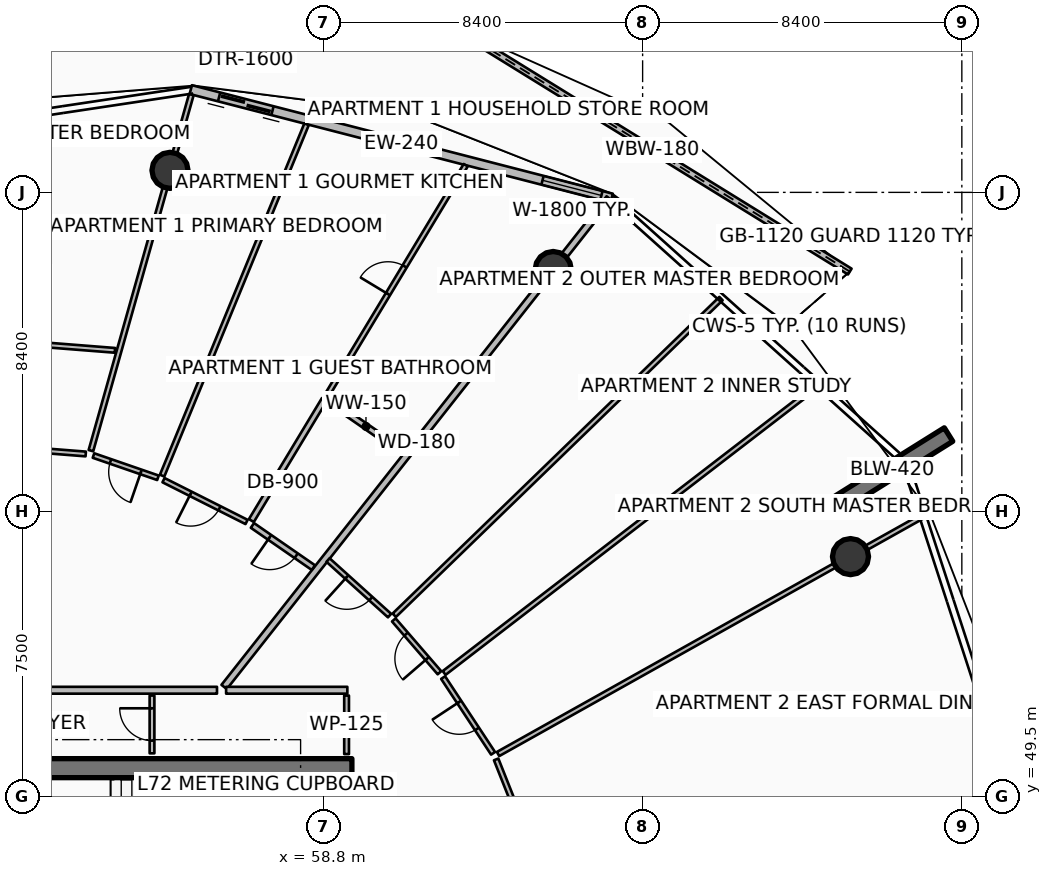
"""IFC4 building model, lengths in metres.
Left out: names, types, materials, properties, quantities, classifications, styles, units other than length and angle.
Written with IfcOpenShell. Run it as: python <this file> out.ifc"""

import sys

from ifc_helpers import new_model, si_unit, direction, frame, frame_2d, origin, origin_2d, place, context, subcontext, project, spatial, polyline, rectangle, circle, outline, extrude, element, fill, save


model = new_model("IFC4")
c1 = context("Model", 3, precision=1e-05, world=origin(), true_north=direction((0.0, 1.0)))
c2 = subcontext(c1, "Body", "Model", "MODEL_VIEW")
j1 = project(units=[si_unit("LENGTHUNIT", "METRE"), si_unit("PLANEANGLEUNIT", "RADIAN")], contexts=[c1])
p1 = place(None, origin())
s1 = spatial("IfcSite", under=j1, at=p1, CompositionType="ELEMENT")
p2 = place(p1, origin())
s2 = spatial("IfcBuilding", under=s1, at=p2, CompositionType="ELEMENT")
p3 = place(p2, frame((0.0, 0.0, 286.75)))
s3 = spatial("IfcBuildingStorey", under=s2, at=p3, CompositionType="ELEMENT", Elevation=286.75)
p4 = place(p3, frame((49.95, 50.25, 0.0), z_axis=(0.0, 0.0, 1.0), x_axis=(1.0, 0.0, 0.0)))
e1 = element("IfcWall", 1, at=p4, inside=s3, PredefinedType="SHEAR", context=c2, shape_type="SweptSolid", body=[
    extrude(rectangle(XDim=9.6, YDim=0.5, at=frame_2d((4.8, 0.0))), origin(), (0.0, 0.0, 1.0), 3.85),
])
p5 = place(p3, frame((59.3, 34.0, 0.0), z_axis=(0.0, 0.0, 1.0), x_axis=(0.0, 1.0, 0.0)))
e2 = element("IfcWall", 2, at=p5, inside=s3, PredefinedType="SHEAR", context=c2, shape_type="SweptSolid", body=[
    extrude(rectangle(XDim=16.0, YDim=0.5, at=frame_2d((8.0, 0.0))), origin(), (0.0, 0.0, 1.0), 3.85),
])
p6 = place(p3, frame((72.281, 57.173, 0.0), z_axis=(0.0, 0.0, 1.0), x_axis=(0.848033572426, 0.529942506352, 0.0)))
e3 = element("IfcWall", 3, at=p6, inside=s3, PredefinedType="SOLIDWALL", context=c2, shape_type="SweptSolid", body=[
    extrude(rectangle(XDim=3.5, YDim=0.42, at=frame_2d((1.75, 0.0))), origin(), (0.0, 0.0, 1.0), 3.85),
])
for number, where, z_axis, x_axis in (
    (4, (72.67, 55.816, 0.0), (0.0, 0.0, 1.0), (1.0, 0.0, 0.0)),
    (5, (64.847, 63.371, 0.0), (0.0, 0.0, 1.0), (1.0, 0.0, 0.0)),
    (6, (54.763, 65.979, 0.0), (0.0, 0.0, 1.0), (1.0, 0.0, 0.0)),
):
    element("IfcColumn", number, at=place(p3, frame(where, z_axis=z_axis, x_axis=x_axis)), inside=s3, PredefinedType="COLUMN", context=c2, shape_type="SweptSolid", body=[
        extrude(circle(Radius=0.475, at=origin_2d()), origin(), (0.0, 0.0, 1.0), 3.59),
    ])
p7 = place(p3, frame((72.652, 63.316, 0.0), z_axis=(0.0, 0.0, 1.0), x_axis=(-0.850900796978, 0.52532640682, 0.0)))
e7 = element("IfcWall", 7, at=p7, inside=s3, PredefinedType="PARAPET", context=c2, shape_type="SweptSolid", body=[
    extrude(outline(polyline([(0.0, 0.0), (12.209, 0.0), (12.208, 1.832), (6.104, 1.696), (0.0, 1.497), (0.0, 0.0)])), frame((0.0, 0.09, 0.0), z_axis=(0.0, -1.0, 0.0), x_axis=(1.0, 0.0, 0.0)), (0.0, 0.0, 1.0), 0.18),
])
p8 = place(p3, frame((66.386, 65.249, 0.0), z_axis=(0.0, 0.0, 1.0), x_axis=(-0.968343758421, 0.249620442927, 0.0)))
e8 = element("IfcWall", 8, at=p8, inside=s3, PredefinedType="SOLIDWALL", context=c2, shape_type="SweptSolid", body=[
    extrude(rectangle(XDim=11.438, YDim=0.24, at=frame_2d((5.719, 0.0))), origin(), (0.0, 0.0, 1.0), 2.54),
])
p9 = place(p8, frame((9.218, 0.0, 0.0)))
e9 = element("IfcOpeningElement", 9, at=p9, cuts=e8, PredefinedType="OPENING", context=c2, shape_type="SweptSolid", body=[
    extrude(rectangle(XDim=1.45, YDim=2.15, at=frame_2d((0.725, 1.075))), frame((0.0, 0.13, 0.0), z_axis=(0.0, -1.0, 0.0), x_axis=(1.0, 0.0, 0.0)), (0.0, 0.0, 1.0), 0.26),
])
p10 = place(p8, frame((0.28, 0.0, 0.65)))
e10 = element("IfcOpeningElement", 10, at=p10, cuts=e8, PredefinedType="OPENING", context=c2, shape_type="SweptSolid", body=[
    extrude(rectangle(XDim=1.6, YDim=1.5, at=frame_2d((0.8, 0.75))), frame((0.0, 0.13, 0.0), z_axis=(0.0, -1.0, 0.0), x_axis=(1.0, 0.0, 0.0)), (0.0, 0.0, 1.0), 0.26),
])
p11 = place(p3, frame((59.41, 50.62, 0.0), z_axis=(0.0, 0.0, 1.0), x_axis=(0.0, 1.0, 0.0)))
e11 = element("IfcWall", 11, at=p11, inside=s3, PredefinedType="PARTITIONING", context=c2, shape_type="SweptSolid", body=[
    extrude(rectangle(XDim=1.54, YDim=0.125, at=frame_2d((0.77, 0.0))), origin(), (0.0, 0.0, 1.0), 3.03),
])
p12 = place(p3, frame((54.29, 50.64, 0.0), z_axis=(0.0, 0.0, 1.0), x_axis=(0.0, 1.0, 0.0)))
e12 = element("IfcWall", 12, at=p12, inside=s3, PredefinedType="PARTITIONING", context=c2, shape_type="SweptSolid", body=[
    extrude(rectangle(XDim=1.52, YDim=0.125, at=frame_2d((0.76, 0.0))), origin(), (0.0, 0.0, 1.0), 3.03),
])
p13 = place(p12, frame((0.335, 0.0, 0.0)))
e13 = element("IfcOpeningElement", 13, at=p13, cuts=e12, PredefinedType="OPENING", context=c2, shape_type="SweptSolid", body=[
    extrude(rectangle(XDim=0.85, YDim=2.06, at=frame_2d((0.425, 1.03))), frame((0.0, 0.073, 0.0), z_axis=(0.0, -1.0, 0.0), x_axis=(1.0, 0.0, 0.0)), (0.0, 0.0, 1.0), 0.145),
])
p14 = place(p3, frame((56.188, 52.386, 0.0), z_axis=(0.0, 0.0, 1.0), x_axis=(0.619097230176, 0.785314344443, 0.0)))
e14 = element("IfcWall", 14, at=p14, inside=s3, PredefinedType="PARTITIONING", context=c2, shape_type="SweptSolid", body=[
    extrude(rectangle(XDim=16.37, YDim=0.18, at=frame_2d((8.185, 0.0))), origin(), (0.0, 0.0, 1.0), 2.957),
])
p15 = place(p3, frame((56.0, 52.3, 0.0), z_axis=(0.0, 0.0, 1.0), x_axis=(-1.0, 0.0, 0.0)))
e15 = element("IfcWall", 15, at=p15, inside=s3, PredefinedType="PARTITIONING", context=c2, shape_type="SweptSolid", body=[
    extrude(rectangle(XDim=4.975, YDim=0.18, at=frame_2d((2.488, 0.0))), origin(), (0.0, 0.0, 1.0), 2.957),
])
p16 = place(p3, frame((58.537, 55.527, 0.0), z_axis=(0.0, 0.0, 1.0), x_axis=(-0.822435430251, 0.568858473671, 0.0)))
e16 = element("IfcWall", 16, at=p16, inside=s3, PredefinedType="PARTITIONING", context=c2, shape_type="SweptSolid", body=[
    extrude(rectangle(XDim=1.951, YDim=0.15, at=frame_2d((0.975, 0.0))), origin(), (0.0, 0.0, 1.0), 2.957),
])
p17 = place(p16, frame((0.55, 0.0, 0.0)))
e17 = element("IfcOpeningElement", 17, at=p17, cuts=e16, PredefinedType="OPENING", context=c2, shape_type="SweptSolid", body=[
    extrude(rectangle(XDim=0.85, YDim=2.06, at=frame_2d((0.425, 1.03))), frame((0.0, 0.085, 0.0), z_axis=(0.0, -1.0, 0.0), x_axis=(1.0, 0.0, 0.0)), (0.0, 0.0, 1.0), 0.17),
])
p18 = place(p3, frame((60.92, 58.55, 0.0), z_axis=(0.0, 0.0, 1.0), x_axis=(-0.822394599949, 0.568917500148, 0.0)))
e18 = element("IfcWall", 18, at=p18, inside=s3, PredefinedType="PARTITIONING", context=c2, shape_type="SweptSolid", body=[
    extrude(rectangle(XDim=2.431, YDim=0.15, at=frame_2d((1.216, 0.0))), origin(), (0.0, 0.0, 1.0), 2.957),
])
p19 = place(p3, frame((56.905, 56.765, 0.0), z_axis=(0.0, 0.0, 1.0), x_axis=(0.516463378785, 0.856309277291, 0.0)))
e19 = element("IfcWall", 19, at=p19, inside=s3, PredefinedType="PARTITIONING", context=c2, shape_type="SweptSolid", body=[
    extrude(rectangle(XDim=3.72, YDim=0.15, at=frame_2d((1.86, 0.0))), origin(), (0.0, 0.0, 1.0), 3.03),
])
p20 = place(p3, frame((58.893, 60.061, 0.0), z_axis=(0.0, 0.0, 1.0), x_axis=(0.516439316059, 0.856323789713, 0.0)))
e20 = element("IfcWall", 20, at=p20, inside=s3, PredefinedType="PARTITIONING", context=c2, shape_type="SweptSolid", body=[
    extrude(rectangle(XDim=7.07, YDim=0.125, at=frame_2d((3.535, 0.0))), origin(), (0.0, 0.0, 1.0), 3.03),
])
p21 = place(p20, frame((3.11, 0.0, 0.0)))
e21 = element("IfcOpeningElement", 21, at=p21, cuts=e20, PredefinedType="OPENING", context=c2, shape_type="SweptSolid", body=[
    extrude(rectangle(XDim=0.85, YDim=2.06, at=frame_2d((0.425, 1.03))), frame((0.0, 0.073, 0.0), z_axis=(0.0, -1.0, 0.0), x_axis=(1.0, 0.0, 0.0)), (0.0, 0.0, 1.0), 0.145),
])
p22 = place(p3, frame((54.556, 57.947, 0.0), z_axis=(0.0, 0.0, 1.0), x_axis=(0.380247271433, 0.924884864493, 0.0)))
e22 = element("IfcWall", 22, at=p22, inside=s3, PredefinedType="PARTITIONING", context=c2, shape_type="SweptSolid", body=[
    extrude(rectangle(XDim=9.995, YDim=0.125, at=frame_2d((4.998, 0.0))), origin(), (0.0, 0.0, 1.0), 3.03),
])
p23 = place(p3, frame((56.778, 56.728, 0.0), z_axis=(0.0, 0.0, 1.0), x_axis=(-0.893226093112, 0.449607769711, 0.0)))
e23 = element("IfcWall", 23, at=p23, inside=s3, PredefinedType="PARTITIONING", context=c2, shape_type="SweptSolid", body=[
    extrude(rectangle(XDim=2.446, YDim=0.125, at=frame_2d((1.223, 0.0))), origin(), (0.0, 0.0, 1.0), 3.03),
])
p24 = place(p23, frame((0.798, 0.0, 0.0)))
e24 = element("IfcOpeningElement", 24, at=p24, cuts=e23, PredefinedType="OPENING", context=c2, shape_type="SweptSolid", body=[
    extrude(rectangle(XDim=0.85, YDim=2.06, at=frame_2d((0.425, 1.03))), frame((0.0, 0.073, 0.0), z_axis=(0.0, -1.0, 0.0), x_axis=(1.0, 0.0, 0.0)), (0.0, 0.0, 1.0), 0.145),
])
p25 = place(p3, frame((54.446, 57.89, 0.0), z_axis=(0.0, 0.0, 1.0), x_axis=(-0.945268821385, 0.326292591576, 0.0)))
e25 = element("IfcWall", 25, at=p25, inside=s3, PredefinedType="PARTITIONING", context=c2, shape_type="SweptSolid", body=[
    extrude(rectangle(XDim=1.794, YDim=0.125, at=frame_2d((0.897, 0.0))), origin(), (0.0, 0.0, 1.0), 2.957),
])
p26 = place(p25, frame((0.472, 0.0, 0.0)))
e26 = element("IfcOpeningElement", 26, at=p26, cuts=e25, PredefinedType="OPENING", context=c2, shape_type="SweptSolid", body=[
    extrude(rectangle(XDim=0.85, YDim=2.06, at=frame_2d((0.425, 1.03))), frame((0.0, 0.073, 0.0), z_axis=(0.0, -1.0, 0.0), x_axis=(1.0, 0.0, 0.0)), (0.0, 0.0, 1.0), 0.145),
])
p27 = place(p3, frame((52.683, 58.604, 0.0), z_axis=(0.0, 0.0, 1.0), x_axis=(0.271442886698, 0.962454549192, 0.0)))
e27 = element("IfcWall", 27, at=p27, inside=s3, PredefinedType="PARTITIONING", context=c2, shape_type="SweptSolid", body=[
    extrude(rectangle(XDim=9.733, YDim=0.125, at=frame_2d((4.866, 0.0))), origin(), (0.0, 0.0, 1.0), 2.957),
])
p28 = place(p3, frame((52.546, 58.517, 0.0), z_axis=(0.0, 0.0, 1.0), x_axis=(-0.996917123382, 0.078461768451, 0.0)))
e28 = element("IfcWall", 28, at=p28, inside=s3, PredefinedType="PARTITIONING", context=c2, shape_type="SweptSolid", body=[
    extrude(rectangle(XDim=6.472, YDim=0.125, at=frame_2d((3.236, 0.0))), origin(), (0.0, 0.0, 1.0), 2.957),
])
p29 = place(p28, frame((2.786, 0.0, 0.0)))
e29 = element("IfcOpeningElement", 29, at=p29, cuts=e28, PredefinedType="OPENING", context=c2, shape_type="SweptSolid", body=[
    extrude(rectangle(XDim=0.9, YDim=2.08, at=frame_2d((0.45, 1.04))), frame((0.0, 0.073, 0.0), z_axis=(0.0, -1.0, 0.0), x_axis=(1.0, 0.0, 0.0)), (0.0, 0.0, 1.0), 0.145),
])
p30 = place(p3, frame((53.315, 61.243, 0.0), z_axis=(0.0, 0.0, 1.0), x_axis=(-0.996917808025, 0.07845306905, 0.0)))
e30 = element("IfcWall", 30, at=p30, inside=s3, PredefinedType="PARTITIONING", context=c2, shape_type="SweptSolid", body=[
    extrude(rectangle(XDim=7.578, YDim=0.125, at=frame_2d((3.789, 0.0))), origin(), (0.0, 0.0, 1.0), 2.957),
])
p31 = place(p30, frame((3.339, 0.0, 0.0)))
e31 = element("IfcOpeningElement", 31, at=p31, cuts=e30, PredefinedType="OPENING", context=c2, shape_type="SweptSolid", body=[
    extrude(rectangle(XDim=0.9, YDim=2.08, at=frame_2d((0.45, 1.04))), frame((0.0, 0.073, 0.0), z_axis=(0.0, -1.0, 0.0), x_axis=(1.0, 0.0, 0.0)), (0.0, 0.0, 1.0), 0.145),
])
p32 = place(p3, frame((64.986, 46.358, 0.0), z_axis=(0.0, 0.0, 1.0), x_axis=(-0.369596956752, 0.929192170414, 0.0)))
e32 = element("IfcWall", 32, at=p32, inside=s3, PredefinedType="PARTITIONING", context=c2, shape_type="SweptSolid", body=[
    extrude(rectangle(XDim=4.437, YDim=0.125, at=frame_2d((2.219, 0.0))), origin(), (0.0, 0.0, 1.0), 2.957),
])
p33 = place(p32, frame((1.768, 0.0, 0.0)))
e33 = element("IfcOpeningElement", 33, at=p33, cuts=e32, PredefinedType="OPENING", context=c2, shape_type="SweptSolid", body=[
    extrude(rectangle(XDim=0.9, YDim=2.08, at=frame_2d((0.45, 1.04))), frame((0.0, 0.073, 0.0), z_axis=(0.0, -1.0, 0.0), x_axis=(1.0, 0.0, 0.0)), (0.0, 0.0, 1.0), 0.145),
])
p34 = place(p3, frame((59.43, 52.3, 0.0), z_axis=(0.0, 0.0, 1.0), x_axis=(-1.0, 0.0, 0.0)))
e34 = element("IfcWall", 34, at=p34, inside=s3, PredefinedType="PARTITIONING", context=c2, shape_type="SweptSolid", body=[
    extrude(rectangle(XDim=3.19, YDim=0.18, at=frame_2d((1.595, 0.0))), origin(), (0.0, 0.0, 1.0), 2.957),
])
p35 = place(p3, frame((63.396, 50.622, 0.0), z_axis=(0.0, 0.0, 1.0), x_axis=(0.872499176967, 0.4886155812, 0.0)))
e35 = element("IfcWall", 35, at=p35, inside=s3, PredefinedType="PARTITIONING", context=c2, shape_type="SweptSolid", body=[
    extrude(rectangle(XDim=12.784, YDim=0.125, at=frame_2d((6.392, 0.0))), origin(), (0.0, 0.0, 1.0), 2.957),
])
p36 = place(p3, frame((61.978, 52.754, 0.0), z_axis=(0.0, 0.0, 1.0), x_axis=(0.792559605076, 0.609794450944, 0.0)))
e36 = element("IfcWall", 36, at=p36, inside=s3, PredefinedType="PARTITIONING", context=c2, shape_type="SweptSolid", body=[
    extrude(rectangle(XDim=12.406, YDim=0.125, at=frame_2d((6.203, 0.0))), origin(), (0.0, 0.0, 1.0), 3.03),
])
p37 = place(p3, frame((60.665, 54.273, 0.0), z_axis=(0.0, 0.0, 1.0), x_axis=(0.718133524399, 0.695905339205, 0.0)))
e37 = element("IfcWall", 37, at=p37, inside=s3, PredefinedType="PARTITIONING", context=c2, shape_type="SweptSolid", body=[
    extrude(rectangle(XDim=11.972, YDim=0.125, at=frame_2d((5.986, 0.0))), origin(), (0.0, 0.0, 1.0), 3.03),
])
p38 = place(p3, frame((63.265, 50.64, 0.0), z_axis=(0.0, 0.0, 1.0), x_axis=(-0.550634170063, 0.834746674602, 0.0)))
e38 = element("IfcWall", 38, at=p38, inside=s3, PredefinedType="PARTITIONING", context=c2, shape_type="SweptSolid", body=[
    extrude(rectangle(XDim=2.387, YDim=0.125, at=frame_2d((1.194, 0.0))), origin(), (0.0, 0.0, 1.0), 2.957),
])
p39 = place(p38, frame((0.769, 0.0, 0.0)))
e39 = element("IfcOpeningElement", 39, at=p39, cuts=e38, PredefinedType="OPENING", context=c2, shape_type="SweptSolid", body=[
    extrude(rectangle(XDim=0.85, YDim=2.06, at=frame_2d((0.425, 1.03))), frame((0.0, 0.073, 0.0), z_axis=(0.0, -1.0, 0.0), x_axis=(1.0, 0.0, 0.0)), (0.0, 0.0, 1.0), 0.145),
])
p40 = place(p3, frame((61.854, 52.76, 0.0), z_axis=(0.0, 0.0, 1.0), x_axis=(-0.653948493608, 0.756539072162, 0.0)))
e40 = element("IfcWall", 40, at=p40, inside=s3, PredefinedType="PARTITIONING", context=c2, shape_type="SweptSolid", body=[
    extrude(rectangle(XDim=1.837, YDim=0.125, at=frame_2d((0.918, 0.0))), origin(), (0.0, 0.0, 1.0), 3.03),
])
p41 = place(p40, frame((0.494, 0.0, 0.0)))
e41 = element("IfcOpeningElement", 41, at=p41, cuts=e40, PredefinedType="OPENING", context=c2, shape_type="SweptSolid", body=[
    extrude(rectangle(XDim=0.85, YDim=2.06, at=frame_2d((0.425, 1.03))), frame((0.0, 0.073, 0.0), z_axis=(0.0, -1.0, 0.0), x_axis=(1.0, 0.0, 0.0)), (0.0, 0.0, 1.0), 0.145),
])
p42 = place(p3, frame((60.541, 54.264, 0.0), z_axis=(0.0, 0.0, 1.0), x_axis=(-0.742235558018, 0.670139072443, 0.0)))
e42 = element("IfcWall", 42, at=p42, inside=s3, PredefinedType="PARTITIONING", context=c2, shape_type="SweptSolid", body=[
    extrude(rectangle(XDim=2.181, YDim=0.125, at=frame_2d((1.09, 0.0))), origin(), (0.0, 0.0, 1.0), 2.957),
])
p43 = place(p42, frame((0.666, 0.0, 0.0)))
e43 = element("IfcOpeningElement", 43, at=p43, cuts=e42, PredefinedType="OPENING", context=c2, shape_type="SweptSolid", body=[
    extrude(rectangle(XDim=0.85, YDim=2.06, at=frame_2d((0.425, 1.03))), frame((0.0, 0.073, 0.0), z_axis=(0.0, -1.0, 0.0), x_axis=(1.0, 0.0, 0.0)), (0.0, 0.0, 1.0), 0.145),
])
p44 = place(p9, origin())
e44 = element("IfcDoor", 44, at=p44, inside=s3, OperationType="DOUBLE_DOOR_SLIDING", PredefinedType="DOOR", context=c2, shape_type="SweptSolid", body=[
    extrude(rectangle(XDim=1.45, YDim=2.15, at=frame_2d((0.725, 1.075))), frame((0.0, 0.025, 0.0), z_axis=(0.0, -1.0, 0.0), x_axis=(1.0, 0.0, 0.0)), (0.0, 0.0, 1.0), 0.05),
])
fill(e9, e44)
p45 = place(p10, origin())
e45 = element("IfcWindow", 45, at=p45, inside=s3, PartitioningType="SINGLE_PANEL", PredefinedType="WINDOW", context=c2, shape_type="SweptSolid", body=[
    extrude(rectangle(XDim=1.6, YDim=1.5, at=frame_2d((0.8, 0.75))), frame((0.0, 0.03, 0.0), z_axis=(0.0, -1.0, 0.0), x_axis=(1.0, 0.0, 0.0)), (0.0, 0.0, 1.0), 0.06),
])
fill(e10, e45)
p46 = place(p13, origin())
e46 = element("IfcDoor", 46, at=p46, inside=s3, OperationType="SINGLE_SWING_RIGHT", PredefinedType="DOOR", context=c2, shape_type="SweptSolid", body=[
    extrude(rectangle(XDim=0.85, YDim=2.06, at=frame_2d((0.425, 1.03))), frame((0.0, 0.025, 0.0), z_axis=(0.0, -1.0, 0.0), x_axis=(1.0, 0.0, 0.0)), (0.0, 0.0, 1.0), 0.05),
])
fill(e13, e46)
p47 = place(p17, origin())
e47 = element("IfcDoor", 47, at=p47, inside=s3, OperationType="SINGLE_SWING_RIGHT", PredefinedType="DOOR", context=c2, shape_type="SweptSolid", body=[
    extrude(rectangle(XDim=0.85, YDim=2.06, at=frame_2d((0.425, 1.03))), frame((0.0, 0.025, 0.0), z_axis=(0.0, -1.0, 0.0), x_axis=(1.0, 0.0, 0.0)), (0.0, 0.0, 1.0), 0.05),
])
fill(e17, e47)
p48 = place(p21, origin())
e48 = element("IfcDoor", 48, at=p48, inside=s3, OperationType="SINGLE_SWING_LEFT", PredefinedType="DOOR", context=c2, shape_type="SweptSolid", body=[
    extrude(rectangle(XDim=0.85, YDim=2.06, at=frame_2d((0.425, 1.03))), frame((0.0, 0.025, 0.0), z_axis=(0.0, -1.0, 0.0), x_axis=(1.0, 0.0, 0.0)), (0.0, 0.0, 1.0), 0.05),
])
fill(e21, e48)
p49 = place(p24, origin())
e49 = element("IfcDoor", 49, at=p49, inside=s3, OperationType="SINGLE_SWING_RIGHT", PredefinedType="DOOR", context=c2, shape_type="SweptSolid", body=[
    extrude(rectangle(XDim=0.85, YDim=2.06, at=frame_2d((0.425, 1.03))), frame((0.0, 0.025, 0.0), z_axis=(0.0, -1.0, 0.0), x_axis=(1.0, 0.0, 0.0)), (0.0, 0.0, 1.0), 0.05),
])
fill(e24, e49)
p50 = place(p26, origin())
e50 = element("IfcDoor", 50, at=p50, inside=s3, OperationType="SINGLE_SWING_LEFT", PredefinedType="DOOR", context=c2, shape_type="SweptSolid", body=[
    extrude(rectangle(XDim=0.85, YDim=2.06, at=frame_2d((0.425, 1.03))), frame((0.0, 0.025, 0.0), z_axis=(0.0, -1.0, 0.0), x_axis=(1.0, 0.0, 0.0)), (0.0, 0.0, 1.0), 0.05),
])
fill(e26, e50)
p51 = place(p39, origin())
e51 = element("IfcDoor", 51, at=p51, inside=s3, OperationType="SINGLE_SWING_RIGHT", PredefinedType="DOOR", context=c2, shape_type="SweptSolid", body=[
    extrude(rectangle(XDim=0.85, YDim=2.06, at=frame_2d((0.425, 1.03))), frame((0.0, 0.025, 0.0), z_axis=(0.0, -1.0, 0.0), x_axis=(1.0, 0.0, 0.0)), (0.0, 0.0, 1.0), 0.05),
])
fill(e39, e51)
p52 = place(p41, origin())
e52 = element("IfcDoor", 52, at=p52, inside=s3, OperationType="SINGLE_SWING_LEFT", PredefinedType="DOOR", context=c2, shape_type="SweptSolid", body=[
    extrude(rectangle(XDim=0.85, YDim=2.06, at=frame_2d((0.425, 1.03))), frame((0.0, 0.025, 0.0), z_axis=(0.0, -1.0, 0.0), x_axis=(1.0, 0.0, 0.0)), (0.0, 0.0, 1.0), 0.05),
])
fill(e41, e52)
p53 = place(p43, origin())
e53 = element("IfcDoor", 53, at=p53, inside=s3, OperationType="SINGLE_SWING_RIGHT", PredefinedType="DOOR", context=c2, shape_type="SweptSolid", body=[
    extrude(rectangle(XDim=0.85, YDim=2.06, at=frame_2d((0.425, 1.03))), frame((0.0, 0.025, 0.0), z_axis=(0.0, -1.0, 0.0), x_axis=(1.0, 0.0, 0.0)), (0.0, 0.0, 1.0), 0.05),
])
fill(e43, e53)
save(model, sys.argv[1])
